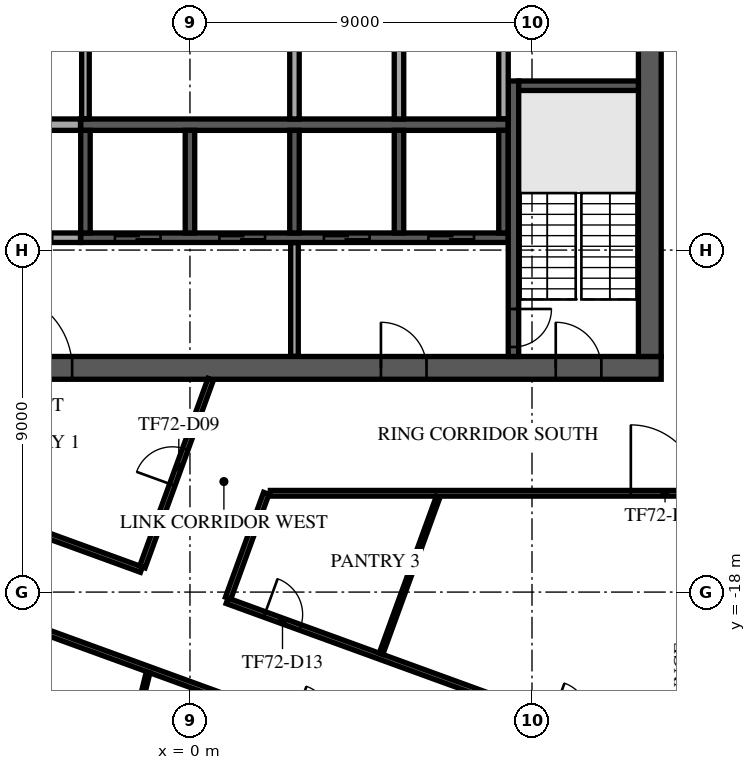
"""IFC4 building model, lengths in metres.
Left out: names, types, materials, properties, quantities, classifications, styles, units other than length and angle.
Written with IfcOpenShell. Run it as: python <this file> out.ifc"""

import sys

from ifc_helpers import new_model, si_unit, direction, frame, frame_2d, origin, place, context, subcontext, project, spatial, rectangle, extrude, element, fill, save


model = new_model("IFC4")
c1 = context("Model", 3, precision=1e-05, world=origin(), true_north=direction((0.0, 1.0)))
c2 = subcontext(c1, "Body", "Model", "MODEL_VIEW")
j1 = project(units=[si_unit("LENGTHUNIT", "METRE"), si_unit("PLANEANGLEUNIT", "RADIAN")], contexts=[c1])
p1 = place(None, origin())
s1 = spatial("IfcSite", under=j1, at=p1, CompositionType="ELEMENT")
p2 = place(p1, origin())
s2 = spatial("IfcBuilding", under=s1, at=p2, CompositionType="ELEMENT")
p3 = place(p2, frame((0.0, 0.0, 304.5)))
s3 = spatial("IfcBuildingStorey", under=s2, at=p3, CompositionType="ELEMENT", Elevation=304.5)
p4 = place(p3, frame((-12.4, -12.1, 0.0), z_axis=(0.0, 0.0, 1.0), x_axis=(1.0, 0.0, 0.0)))
e1 = element("IfcWall", 1, at=p4, inside=s3, PredefinedType="SHEAR", context=c2, shape_type="SweptSolid", body=[
    extrude(rectangle(XDim=24.8, YDim=0.6, at=frame_2d((12.4, 0.0))), origin(), (0.0, 0.0, 1.0), 3.65),
])
p5 = place(p4, frame((7.3, 0.0, 0.0)))
e2 = element("IfcOpeningElement", 2, at=p5, cuts=e1, PredefinedType="OPENING", context=c2, shape_type="SweptSolid", body=[
    extrude(rectangle(XDim=2.0, YDim=2.1, at=frame_2d((1.0, 1.05))), frame((0.0, 0.31, 0.0), z_axis=(0.0, -1.0, 0.0), x_axis=(1.0, 0.0, 0.0)), (0.0, 0.0, 1.0), 0.62),
])
p6 = place(p4, frame((17.425, 0.0, 0.0)))
e3 = element("IfcOpeningElement", 3, at=p6, cuts=e1, PredefinedType="OPENING", context=c2, shape_type="SweptSolid", body=[
    extrude(rectangle(XDim=1.2, YDim=2.1, at=frame_2d((0.6, 1.05))), frame((0.0, 0.31, 0.0), z_axis=(0.0, -1.0, 0.0), x_axis=(1.0, 0.0, 0.0)), (0.0, 0.0, 1.0), 0.62),
])
p7 = place(p4, frame((1.575, 0.0, 0.0)))
e4 = element("IfcOpeningElement", 4, at=p7, cuts=e1, PredefinedType="OPENING", context=c2, shape_type="SweptSolid", body=[
    extrude(rectangle(XDim=1.2, YDim=2.1, at=frame_2d((0.6, 1.05))), frame((0.0, 0.31, 0.0), z_axis=(0.0, -1.0, 0.0), x_axis=(1.0, 0.0, 0.0)), (0.0, 0.0, 1.0), 0.62),
])
p8 = place(p4, frame((22.025, 0.0, 0.0)))
e5 = element("IfcOpeningElement", 5, at=p8, cuts=e1, PredefinedType="OPENING", context=c2, shape_type="SweptSolid", body=[
    extrude(rectangle(XDim=1.2, YDim=2.1, at=frame_2d((0.6, 1.05))), frame((0.0, 0.31, 0.0), z_axis=(0.0, -1.0, 0.0), x_axis=(1.0, 0.0, 0.0)), (0.0, 0.0, 1.0), 0.62),
])
p9 = place(p3, frame((12.1, -11.8, 0.0), z_axis=(0.0, 0.0, 1.0), x_axis=(0.0, 1.0, 0.0)))
e6 = element("IfcWall", 6, at=p9, inside=s3, PredefinedType="SHEAR", context=c2, shape_type="SweptSolid", body=[
    extrude(rectangle(XDim=23.6, YDim=0.6, at=frame_2d((11.8, 0.0))), origin(), (0.0, 0.0, 1.0), 3.65),
])
p10 = place(p9, frame((10.6, 0.0, 0.0)))
e7 = element("IfcOpeningElement", 7, at=p10, cuts=e6, PredefinedType="OPENING", context=c2, shape_type="SweptSolid", body=[
    extrude(rectangle(XDim=2.4, YDim=2.4, at=frame_2d((1.2, 1.2))), frame((0.0, 0.31, 0.0), z_axis=(0.0, -1.0, 0.0), x_axis=(1.0, 0.0, 0.0)), (0.0, 0.0, 1.0), 0.62),
])
p11 = place(p3, frame((-2.875, -5.7, 0.0), z_axis=(0.0, 0.0, 1.0), x_axis=(1.0, 0.0, 0.0)))
e8 = element("IfcWall", 8, at=p11, inside=s3, PredefinedType="SOLIDWALL", context=c2, shape_type="SweptSolid", body=[
    extrude(rectangle(XDim=11.25, YDim=0.3, at=frame_2d((5.625, 0.0))), origin(), (0.0, 0.0, 1.0), 3.65),
])
for number, where, z_axis, x_axis in (
    (9, (2.75, -5.55, 0.0), (0.0, 0.0, 1.0), (0.0, 1.0, 0.0)),
    (10, (5.5, -5.55, 0.0), (0.0, 0.0, 1.0), (0.0, 1.0, 0.0)),
):
    element("IfcWall", number, at=place(p3, frame(where, z_axis=z_axis, x_axis=x_axis)), inside=s3, PredefinedType="SOLIDWALL", context=c2, shape_type="SweptSolid", body=[
        extrude(rectangle(XDim=2.7, YDim=0.25, at=frame_2d((1.35, 0.0))), origin(), (0.0, 0.0, 1.0), 3.65),
    ])
p12 = place(p3, frame((-2.875, -8.675, 0.0), z_axis=(0.0, 0.0, 1.0), x_axis=(1.0, 0.0, 0.0)))
e11 = element("IfcWall", 11, at=p12, inside=s3, PredefinedType="SOLIDWALL", context=c2, shape_type="SweptSolid", body=[
    extrude(rectangle(XDim=11.25, YDim=0.25, at=frame_2d((5.625, 0.0))), origin(), (0.0, 0.0, 1.0), 3.65),
])
p13 = place(p12, frame((0.9, 0.0, 0.0)))
e12 = element("IfcOpeningElement", 12, at=p13, cuts=e11, PredefinedType="OPENING", context=c2, shape_type="SweptSolid", body=[
    extrude(rectangle(XDim=1.2, YDim=2.1, at=frame_2d((0.6, 1.05))), frame((0.0, 0.135, 0.0), z_axis=(0.0, -1.0, 0.0), x_axis=(1.0, 0.0, 0.0)), (0.0, 0.0, 1.0), 0.27),
])
p14 = place(p12, frame((3.65, 0.0, 0.0)))
e13 = element("IfcOpeningElement", 13, at=p14, cuts=e11, PredefinedType="OPENING", context=c2, shape_type="SweptSolid", body=[
    extrude(rectangle(XDim=1.2, YDim=2.1, at=frame_2d((0.6, 1.05))), frame((0.0, 0.135, 0.0), z_axis=(0.0, -1.0, 0.0), x_axis=(1.0, 0.0, 0.0)), (0.0, 0.0, 1.0), 0.27),
])
p15 = place(p12, frame((6.4, 0.0, 0.0)))
e14 = element("IfcOpeningElement", 14, at=p15, cuts=e11, PredefinedType="OPENING", context=c2, shape_type="SweptSolid", body=[
    extrude(rectangle(XDim=1.2, YDim=2.1, at=frame_2d((0.6, 1.05))), frame((0.0, 0.135, 0.0), z_axis=(0.0, -1.0, 0.0), x_axis=(1.0, 0.0, 0.0)), (0.0, 0.0, 1.0), 0.27),
])
p16 = place(p12, frame((9.15, 0.0, 0.0)))
e15 = element("IfcOpeningElement", 15, at=p16, cuts=e11, PredefinedType="OPENING", context=c2, shape_type="SweptSolid", body=[
    extrude(rectangle(XDim=1.2, YDim=2.1, at=frame_2d((0.6, 1.05))), frame((0.0, 0.135, 0.0), z_axis=(0.0, -1.0, 0.0), x_axis=(1.0, 0.0, 0.0)), (0.0, 0.0, 1.0), 0.27),
])
for number, where, z_axis, x_axis in (
    (16, (-2.75, -8.55, 0.0), (0.0, 0.0, 1.0), (0.0, 1.0, 0.0)),
    (17, (0.0, -8.55, 0.0), (0.0, 0.0, 1.0), (0.0, 1.0, 0.0)),
    (18, (2.75, -8.55, 0.0), (0.0, 0.0, 1.0), (0.0, 1.0, 0.0)),
    (19, (5.5, -8.55, 0.0), (0.0, 0.0, 1.0), (0.0, 1.0, 0.0)),
    (20, (8.25, -8.55, 0.0), (0.0, 0.0, 1.0), (0.0, 1.0, 0.0)),
):
    element("IfcWall", number, at=place(p3, frame(where, z_axis=z_axis, x_axis=x_axis)), inside=s3, PredefinedType="SOLIDWALL", context=c2, shape_type="SweptSolid", body=[
        extrude(rectangle(XDim=2.7, YDim=0.25, at=frame_2d((1.35, 0.0))), origin(), (0.0, 0.0, 1.0), 3.65),
    ])
p17 = place(p3, frame((8.512, -4.55, 0.0), z_axis=(0.0, 0.0, 1.0), x_axis=(0.0, -1.0, 0.0)))
e21 = element("IfcWall", 21, at=p17, inside=s3, PredefinedType="SOLIDWALL", context=c2, shape_type="SweptSolid", body=[
    extrude(rectangle(XDim=7.25, YDim=0.275, at=frame_2d((3.625, 0.0))), origin(), (0.0, 0.0, 1.0), 3.65),
])
p18 = place(p17, frame((6.0, 0.0, 0.0)))
e22 = element("IfcOpeningElement", 22, at=p18, cuts=e21, PredefinedType="OPENING", context=c2, shape_type="SweptSolid", body=[
    extrude(rectangle(XDim=1.0, YDim=2.1, at=frame_2d((0.5, 1.05))), frame((0.0, 0.147, 0.0), z_axis=(0.0, -1.0, 0.0), x_axis=(1.0, 0.0, 0.0)), (0.0, 0.0, 1.0), 0.295),
])
p19 = place(p3, frame((8.65, -4.675, 0.0), z_axis=(0.0, 0.0, 1.0), x_axis=(1.0, 0.0, 0.0)))
e23 = element("IfcWall", 23, at=p19, inside=s3, PredefinedType="SOLIDWALL", context=c2, shape_type="SweptSolid", body=[
    extrude(rectangle(XDim=3.15, YDim=0.25, at=frame_2d((1.575, 0.0))), origin(), (0.0, 0.0, 1.0), 3.65),
])
p20 = place(p3, frame((2.75, -11.795, 0.0), z_axis=(0.0, 0.0, 1.0), x_axis=(0.0, 1.0, 0.0)))
e24 = element("IfcWall", 24, at=p20, inside=s3, PredefinedType="PARTITIONING", context=c2, shape_type="SweptSolid", body=[
    extrude(rectangle(XDim=2.99, YDim=0.2, at=frame_2d((1.495, 0.0))), origin(), (0.0, 0.0, 1.0), 3.65),
])
p21 = place(p3, frame((-8.37, -8.675, 0.0), z_axis=(0.0, 0.0, 1.0), x_axis=(1.0, 0.0, 0.0)))
e25 = element("IfcWall", 25, at=p21, inside=s3, PredefinedType="PARTITIONING", context=c2, shape_type="SweptSolid", body=[
    extrude(rectangle(XDim=5.49, YDim=0.25, at=frame_2d((2.745, 0.0))), origin(), (0.0, 0.0, 1.0), 3.65),
])
p22 = place(p21, frame((0.995, 0.0, 0.0)))
e26 = element("IfcOpeningElement", 26, at=p22, cuts=e25, PredefinedType="OPENING", context=c2, shape_type="SweptSolid", body=[
    extrude(rectangle(XDim=1.0, YDim=2.1, at=frame_2d((0.5, 1.05))), frame((0.0, 0.135, 0.0), z_axis=(0.0, -1.0, 0.0), x_axis=(1.0, 0.0, 0.0)), (0.0, 0.0, 1.0), 0.27),
])
p23 = place(p21, frame((3.745, 0.0, 0.0)))
e27 = element("IfcOpeningElement", 27, at=p23, cuts=e25, PredefinedType="OPENING", context=c2, shape_type="SweptSolid", body=[
    extrude(rectangle(XDim=1.0, YDim=2.1, at=frame_2d((0.5, 1.05))), frame((0.0, 0.135, 0.0), z_axis=(0.0, -1.0, 0.0), x_axis=(1.0, 0.0, 0.0)), (0.0, 0.0, 1.0), 0.27),
])
p24 = place(p3, frame((-8.35, -5.7, 0.0), z_axis=(0.0, 0.0, 1.0), x_axis=(1.0, 0.0, 0.0)))
e28 = element("IfcWall", 28, at=p24, inside=s3, PredefinedType="PARTITIONING", context=c2, shape_type="SweptSolid", body=[
    extrude(rectangle(XDim=5.47, YDim=0.3, at=frame_2d((2.735, 0.0))), origin(), (0.0, 0.0, 1.0), 3.65),
])
p25 = place(p3, frame((-2.75, -5.545, 0.0), z_axis=(0.0, 0.0, 1.0), x_axis=(0.0, 1.0, 0.0)))
e29 = element("IfcWall", 29, at=p25, inside=s3, PredefinedType="PARTITIONING", context=c2, shape_type="SweptSolid", body=[
    extrude(rectangle(XDim=2.69, YDim=0.2, at=frame_2d((1.345, 0.0))), origin(), (0.0, 0.0, 1.0), 3.65),
])
p26 = place(p3, frame((8.25, -5.545, 0.0), z_axis=(0.0, 0.0, 1.0), x_axis=(0.0, 1.0, 0.0)))
e30 = element("IfcWall", 30, at=p26, inside=s3, PredefinedType="PARTITIONING", context=c2, shape_type="SweptSolid", body=[
    extrude(rectangle(XDim=2.69, YDim=0.25, at=frame_2d((1.345, 0.0))), origin(), (0.0, 0.0, 1.0), 3.65),
])
p27 = place(p3, frame((-29.882, -20.73, 0.0), z_axis=(0.0, 0.0, 1.0), x_axis=(0.939693709578, -0.34201715188, 0.0)))
e31 = element("IfcWall", 31, at=p27, inside=s3, PredefinedType="STANDARD", context=c2, shape_type="SweptSolid", body=[
    extrude(rectangle(XDim=41.979, YDim=0.6, at=frame_2d((20.99, 0.0))), origin(), (0.0, 0.0, 1.0), 3.65),
])
p28 = place(p27, frame((1.232, 0.0, 0.9)))
e32 = element("IfcOpeningElement", 32, at=p28, cuts=e31, PredefinedType="OPENING", context=c2, shape_type="SweptSolid", body=[
    extrude(rectangle(XDim=2.2, YDim=2.1, at=frame_2d((1.1, 1.05))), frame((0.0, 0.31, 0.0), z_axis=(0.0, -1.0, 0.0), x_axis=(1.0, 0.0, 0.0)), (0.0, 0.0, 1.0), 0.62),
])
p29 = place(p27, frame((5.896, 0.0, 0.9)))
e33 = element("IfcOpeningElement", 33, at=p29, cuts=e31, PredefinedType="OPENING", context=c2, shape_type="SweptSolid", body=[
    extrude(rectangle(XDim=2.2, YDim=2.1, at=frame_2d((1.1, 1.05))), frame((0.0, 0.31, 0.0), z_axis=(0.0, -1.0, 0.0), x_axis=(1.0, 0.0, 0.0)), (0.0, 0.0, 1.0), 0.62),
])
p30 = place(p27, frame((10.561, 0.0, 0.9)))
e34 = element("IfcOpeningElement", 34, at=p30, cuts=e31, PredefinedType="OPENING", context=c2, shape_type="SweptSolid", body=[
    extrude(rectangle(XDim=2.2, YDim=2.1, at=frame_2d((1.1, 1.05))), frame((0.0, 0.31, 0.0), z_axis=(0.0, -1.0, 0.0), x_axis=(1.0, 0.0, 0.0)), (0.0, 0.0, 1.0), 0.62),
])
p31 = place(p27, frame((15.225, 0.0, 0.9)))
e35 = element("IfcOpeningElement", 35, at=p31, cuts=e31, PredefinedType="OPENING", context=c2, shape_type="SweptSolid", body=[
    extrude(rectangle(XDim=2.2, YDim=2.1, at=frame_2d((1.1, 1.05))), frame((0.0, 0.31, 0.0), z_axis=(0.0, -1.0, 0.0), x_axis=(1.0, 0.0, 0.0)), (0.0, 0.0, 1.0), 0.62),
])
p32 = place(p27, frame((19.89, 0.0, 0.9)))
e36 = element("IfcOpeningElement", 36, at=p32, cuts=e31, PredefinedType="OPENING", context=c2, shape_type="SweptSolid", body=[
    extrude(rectangle(XDim=2.2, YDim=2.1, at=frame_2d((1.1, 1.05))), frame((0.0, 0.31, 0.0), z_axis=(0.0, -1.0, 0.0), x_axis=(1.0, 0.0, 0.0)), (0.0, 0.0, 1.0), 0.62),
])
p33 = place(p27, frame((24.554, 0.0, 0.9)))
e37 = element("IfcOpeningElement", 37, at=p33, cuts=e31, PredefinedType="OPENING", context=c2, shape_type="SweptSolid", body=[
    extrude(rectangle(XDim=2.2, YDim=2.1, at=frame_2d((1.1, 1.05))), frame((0.0, 0.31, 0.0), z_axis=(0.0, -1.0, 0.0), x_axis=(1.0, 0.0, 0.0)), (0.0, 0.0, 1.0), 0.62),
])
p34 = place(p27, frame((29.218, 0.0, 0.9)))
e38 = element("IfcOpeningElement", 38, at=p34, cuts=e31, PredefinedType="OPENING", context=c2, shape_type="SweptSolid", body=[
    extrude(rectangle(XDim=2.2, YDim=2.1, at=frame_2d((1.1, 1.05))), frame((0.0, 0.31, 0.0), z_axis=(0.0, -1.0, 0.0), x_axis=(1.0, 0.0, 0.0)), (0.0, 0.0, 1.0), 0.62),
])
p35 = place(p27, frame((33.883, 0.0, 0.9)))
e39 = element("IfcOpeningElement", 39, at=p35, cuts=e31, PredefinedType="OPENING", context=c2, shape_type="SweptSolid", body=[
    extrude(rectangle(XDim=2.2, YDim=2.1, at=frame_2d((1.1, 1.05))), frame((0.0, 0.31, 0.0), z_axis=(0.0, -1.0, 0.0), x_axis=(1.0, 0.0, 0.0)), (0.0, 0.0, 1.0), 0.62),
])
p36 = place(p27, frame((38.547, 0.0, 0.9)))
e40 = element("IfcOpeningElement", 40, at=p36, cuts=e31, PredefinedType="OPENING", context=c2, shape_type="SweptSolid", body=[
    extrude(rectangle(XDim=2.2, YDim=2.1, at=frame_2d((1.1, 1.05))), frame((0.0, 0.31, 0.0), z_axis=(0.0, -1.0, 0.0), x_axis=(1.0, 0.0, 0.0)), (0.0, 0.0, 1.0), 0.62),
])
p37 = place(p3, frame((-24.679, -11.445, 0.0), z_axis=(0.0, 0.0, 1.0), x_axis=(0.939685239834, -0.342040421645, 0.0)))
e41 = element("IfcWall", 41, at=p37, inside=s3, PredefinedType="PARTITIONING", context=c2, shape_type="SweptSolid", body=[
    extrude(rectangle(XDim=38.628, YDim=0.15, at=frame_2d((19.314, 0.0))), origin(), (0.0, 0.0, 1.0), 3.25),
])
p38 = place(p37, frame((8.764, 0.0, 0.0)))
e42 = element("IfcOpeningElement", 42, at=p38, cuts=e41, PredefinedType="OPENING", context=c2, shape_type="SweptSolid", body=[
    extrude(rectangle(XDim=1.0, YDim=2.1, at=frame_2d((0.5, 1.05))), frame((0.0, 0.085, 0.0), z_axis=(0.0, -1.0, 0.0), x_axis=(1.0, 0.0, 0.0)), (0.0, 0.0, 1.0), 0.17),
])
p39 = place(p37, frame((19.503, 0.0, 0.0)))
e43 = element("IfcOpeningElement", 43, at=p39, cuts=e41, PredefinedType="OPENING", context=c2, shape_type="SweptSolid", body=[
    extrude(rectangle(XDim=1.0, YDim=2.1, at=frame_2d((0.5, 1.05))), frame((0.0, 0.085, 0.0), z_axis=(0.0, -1.0, 0.0), x_axis=(1.0, 0.0, 0.0)), (0.0, 0.0, 1.0), 0.17),
])
p40 = place(p37, frame((29.163, 0.0, 0.0)))
e44 = element("IfcOpeningElement", 44, at=p40, cuts=e41, PredefinedType="OPENING", context=c2, shape_type="SweptSolid", body=[
    extrude(rectangle(XDim=1.0, YDim=2.1, at=frame_2d((0.5, 1.05))), frame((0.0, 0.085, 0.0), z_axis=(0.0, -1.0, 0.0), x_axis=(1.0, 0.0, 0.0)), (0.0, 0.0, 1.0), 0.17),
])
p41 = place(p3, frame((-14.604, -12.558, 0.0), z_axis=(0.0, 0.0, 1.0), x_axis=(0.93968732693, -0.342034687724, 0.0)))
e45 = element("IfcWall", 45, at=p41, inside=s3, PredefinedType="PARTITIONING", context=c2, shape_type="SweptSolid", body=[
    extrude(rectangle(XDim=14.182, YDim=0.15, at=frame_2d((7.091, 0.0))), origin(), (0.0, 0.0, 1.0), 3.25),
])
p42 = place(p3, frame((-1.251, -17.338, 0.0), z_axis=(0.0, 0.0, 1.0), x_axis=(0.341963126629, 0.939713371207, 0.0)))
e46 = element("IfcWall", 46, at=p42, inside=s3, PredefinedType="PARTITIONING", context=c2, shape_type="SweptSolid", body=[
    extrude(rectangle(XDim=5.255, YDim=0.15, at=frame_2d((2.628, 0.0))), origin(), (0.0, 0.0, 1.0), 3.65),
])
p43 = place(p42, frame((2.3, 0.0, 0.0)))
e47 = element("IfcOpeningElement", 47, at=p43, cuts=e46, PredefinedType="OPENING", context=c2, shape_type="SweptSolid", body=[
    extrude(rectangle(XDim=1.0, YDim=2.1, at=frame_2d((0.5, 1.05))), frame((0.0, 0.085, 0.0), z_axis=(0.0, -1.0, 0.0), x_axis=(1.0, 0.0, 0.0)), (0.0, 0.0, 1.0), 0.17),
])
p44 = place(p3, frame((0.978, -18.23, 0.0), z_axis=(0.0, 0.0, 1.0), x_axis=(0.939684094149, -0.34204356916, 0.0)))
e48 = element("IfcWall", 48, at=p44, inside=s3, PredefinedType="PARTITIONING", context=c2, shape_type="SweptSolid", body=[
    extrude(rectangle(XDim=12.198, YDim=0.15, at=frame_2d((6.099, 0.0))), origin(), (0.0, 0.0, 1.0), 3.25),
])
p45 = place(p44, frame((1.05, 0.0, 0.0)))
e49 = element("IfcOpeningElement", 49, at=p45, cuts=e48, PredefinedType="OPENING", context=c2, shape_type="SweptSolid", body=[
    extrude(rectangle(XDim=1.0, YDim=2.1, at=frame_2d((0.5, 1.05))), frame((0.0, 0.085, 0.0), z_axis=(0.0, -1.0, 0.0), x_axis=(1.0, 0.0, 0.0)), (0.0, 0.0, 1.0), 0.17),
])
p46 = place(p44, frame((9.083, 0.0, 0.0)))
e50 = element("IfcOpeningElement", 50, at=p46, cuts=e48, PredefinedType="OPENING", context=c2, shape_type="SweptSolid", body=[
    extrude(rectangle(XDim=1.0, YDim=2.1, at=frame_2d((0.5, 1.05))), frame((0.0, 0.085, 0.0), z_axis=(0.0, -1.0, 0.0), x_axis=(1.0, 0.0, 0.0)), (0.0, 0.0, 1.0), 0.17),
])
p47 = place(p3, frame((1.004, -18.159, 0.0), z_axis=(0.0, 0.0, 1.0), x_axis=(0.342023405877, 0.939691433308, 0.0)))
e51 = element("IfcWall", 51, at=p47, inside=s3, PredefinedType="PARTITIONING", context=c2, shape_type="SweptSolid", body=[
    extrude(rectangle(XDim=2.937, YDim=0.15, at=frame_2d((1.468, 0.0))), origin(), (0.0, 0.0, 1.0), 3.65),
])
p48 = place(p3, frame((2.115, -15.4, 0.0), z_axis=(0.0, 0.0, 1.0), x_axis=(1.0, 0.0, 0.0)))
e52 = element("IfcWall", 52, at=p48, inside=s3, PredefinedType="PARTITIONING", context=c2, shape_type="SweptSolid", body=[
    extrude(rectangle(XDim=13.285, YDim=0.15, at=frame_2d((6.643, 0.0))), origin(), (0.0, 0.0, 1.0), 3.25),
])
p49 = place(p48, frame((9.486, 0.0, 0.0)))
e53 = element("IfcOpeningElement", 53, at=p49, cuts=e52, PredefinedType="OPENING", context=c2, shape_type="SweptSolid", body=[
    extrude(rectangle(XDim=1.8, YDim=2.1, at=frame_2d((0.9, 1.05))), frame((0.0, 0.085, 0.0), z_axis=(0.0, -1.0, 0.0), x_axis=(1.0, 0.0, 0.0)), (0.0, 0.0, 1.0), 0.17),
])
p50 = place(p3, frame((-3.54, -29.996, 0.0), z_axis=(0.0, 0.0, 1.0), x_axis=(0.239628478721, 0.970864662137, 0.0)))
e54 = element("IfcWall", 54, at=p50, inside=s3, PredefinedType="PARTITIONING", context=c2, shape_type="SweptSolid", body=[
    extrude(rectangle(XDim=10.18, YDim=0.1, at=frame_2d((5.09, 0.0))), origin(), (0.0, 0.0, 1.0), 3.05),
])
p51 = place(p3, frame((5.028, -19.624, 0.0), z_axis=(0.0, 0.0, 1.0), x_axis=(0.342064062603, 0.939676634314, 0.0)))
e55 = element("IfcWall", 55, at=p51, inside=s3, PredefinedType="PARTITIONING", context=c2, shape_type="SweptSolid", body=[
    extrude(rectangle(XDim=4.396, YDim=0.1, at=frame_2d((2.198, 0.0))), origin(), (0.0, 0.0, 1.0), 3.65),
])
p52 = place(p5, origin())
e56 = element("IfcDoor", 56, at=p52, inside=s3, OperationType="SINGLE_SWING_LEFT", PredefinedType="DOOR", context=c2, shape_type="SweptSolid", body=[
    extrude(rectangle(XDim=2.0, YDim=2.1, at=frame_2d((1.0, 1.05))), frame((0.0, 0.025, 0.0), z_axis=(0.0, -1.0, 0.0), x_axis=(1.0, 0.0, 0.0)), (0.0, 0.0, 1.0), 0.05),
])
fill(e2, e56)
p53 = place(p6, origin())
e57 = element("IfcDoor", 57, at=p53, inside=s3, OperationType="SINGLE_SWING_LEFT", PredefinedType="DOOR", context=c2, shape_type="SweptSolid", body=[
    extrude(rectangle(XDim=1.2, YDim=2.1, at=frame_2d((0.6, 1.05))), frame((0.0, 0.025, 0.0), z_axis=(0.0, -1.0, 0.0), x_axis=(1.0, 0.0, 0.0)), (0.0, 0.0, 1.0), 0.05),
])
fill(e3, e57)
p54 = place(p8, origin())
e58 = element("IfcDoor", 58, at=p54, inside=s3, OperationType="SINGLE_SWING_LEFT", PredefinedType="DOOR", context=c2, shape_type="SweptSolid", body=[
    extrude(rectangle(XDim=1.2, YDim=2.1, at=frame_2d((0.6, 1.05))), frame((0.0, 0.025, 0.0), z_axis=(0.0, -1.0, 0.0), x_axis=(1.0, 0.0, 0.0)), (0.0, 0.0, 1.0), 0.05),
])
fill(e5, e58)
p55 = place(p13, origin())
e59 = element("IfcDoor", 59, at=p55, inside=s3, OperationType="DOUBLE_DOOR_SLIDING", PredefinedType="DOOR", context=c2, shape_type="SweptSolid", body=[
    extrude(rectangle(XDim=1.2, YDim=2.1, at=frame_2d((0.6, 1.05))), frame((0.0, 0.025, 0.0), z_axis=(0.0, -1.0, 0.0), x_axis=(1.0, 0.0, 0.0)), (0.0, 0.0, 1.0), 0.05),
])
fill(e12, e59)
p56 = place(p14, origin())
e60 = element("IfcDoor", 60, at=p56, inside=s3, OperationType="DOUBLE_DOOR_SLIDING", PredefinedType="DOOR", context=c2, shape_type="SweptSolid", body=[
    extrude(rectangle(XDim=1.2, YDim=2.1, at=frame_2d((0.6, 1.05))), frame((0.0, 0.025, 0.0), z_axis=(0.0, -1.0, 0.0), x_axis=(1.0, 0.0, 0.0)), (0.0, 0.0, 1.0), 0.05),
])
fill(e13, e60)
p57 = place(p15, origin())
e61 = element("IfcDoor", 61, at=p57, inside=s3, OperationType="DOUBLE_DOOR_SLIDING", PredefinedType="DOOR", context=c2, shape_type="SweptSolid", body=[
    extrude(rectangle(XDim=1.2, YDim=2.1, at=frame_2d((0.6, 1.05))), frame((0.0, 0.025, 0.0), z_axis=(0.0, -1.0, 0.0), x_axis=(1.0, 0.0, 0.0)), (0.0, 0.0, 1.0), 0.05),
])
fill(e14, e61)
p58 = place(p16, origin())
e62 = element("IfcDoor", 62, at=p58, inside=s3, OperationType="DOUBLE_DOOR_SLIDING", PredefinedType="DOOR", context=c2, shape_type="SweptSolid", body=[
    extrude(rectangle(XDim=1.2, YDim=2.1, at=frame_2d((0.6, 1.05))), frame((0.0, 0.025, 0.0), z_axis=(0.0, -1.0, 0.0), x_axis=(1.0, 0.0, 0.0)), (0.0, 0.0, 1.0), 0.05),
])
fill(e15, e62)
p59 = place(p18, origin())
e63 = element("IfcDoor", 63, at=p59, inside=s3, OperationType="SINGLE_SWING_LEFT", PredefinedType="DOOR", context=c2, shape_type="SweptSolid", body=[
    extrude(rectangle(XDim=1.0, YDim=2.1, at=frame_2d((0.5, 1.05))), frame((0.0, 0.025, 0.0), z_axis=(0.0, -1.0, 0.0), x_axis=(1.0, 0.0, 0.0)), (0.0, 0.0, 1.0), 0.05),
])
fill(e22, e63)
p60 = place(p43, origin())
e64 = element("IfcDoor", 64, at=p60, inside=s3, OperationType="SINGLE_SWING_RIGHT", PredefinedType="DOOR", context=c2, shape_type="SweptSolid", body=[
    extrude(rectangle(XDim=1.0, YDim=2.1, at=frame_2d((0.5, 1.05))), frame((0.0, 0.025, 0.0), z_axis=(0.0, -1.0, 0.0), x_axis=(1.0, 0.0, 0.0)), (0.0, 0.0, 1.0), 0.05),
])
fill(e47, e64)
p61 = place(p45, origin())
e65 = element("IfcDoor", 65, at=p61, inside=s3, OperationType="SINGLE_SWING_LEFT", PredefinedType="DOOR", context=c2, shape_type="SweptSolid", body=[
    extrude(rectangle(XDim=1.0, YDim=2.1, at=frame_2d((0.5, 1.05))), frame((0.0, 0.025, 0.0), z_axis=(0.0, -1.0, 0.0), x_axis=(1.0, 0.0, 0.0)), (0.0, 0.0, 1.0), 0.05),
])
fill(e49, e65)
p62 = place(p49, frame((1.8, 0.0, 0.0), z_axis=(0.0, 0.0, 1.0), x_axis=(-1.0, 0.0, 0.0)))
e66 = element("IfcDoor", 66, at=p62, inside=s3, OperationType="DOUBLE_DOOR_SINGLE_SWING", PredefinedType="DOOR", context=c2, shape_type="SweptSolid", body=[
    extrude(rectangle(XDim=1.8, YDim=2.1, at=frame_2d((0.9, 1.05))), frame((0.0, 0.025, 0.0), z_axis=(0.0, -1.0, 0.0), x_axis=(1.0, 0.0, 0.0)), (0.0, 0.0, 1.0), 0.05),
])
fill(e53, e66)
save(model, sys.argv[1])
